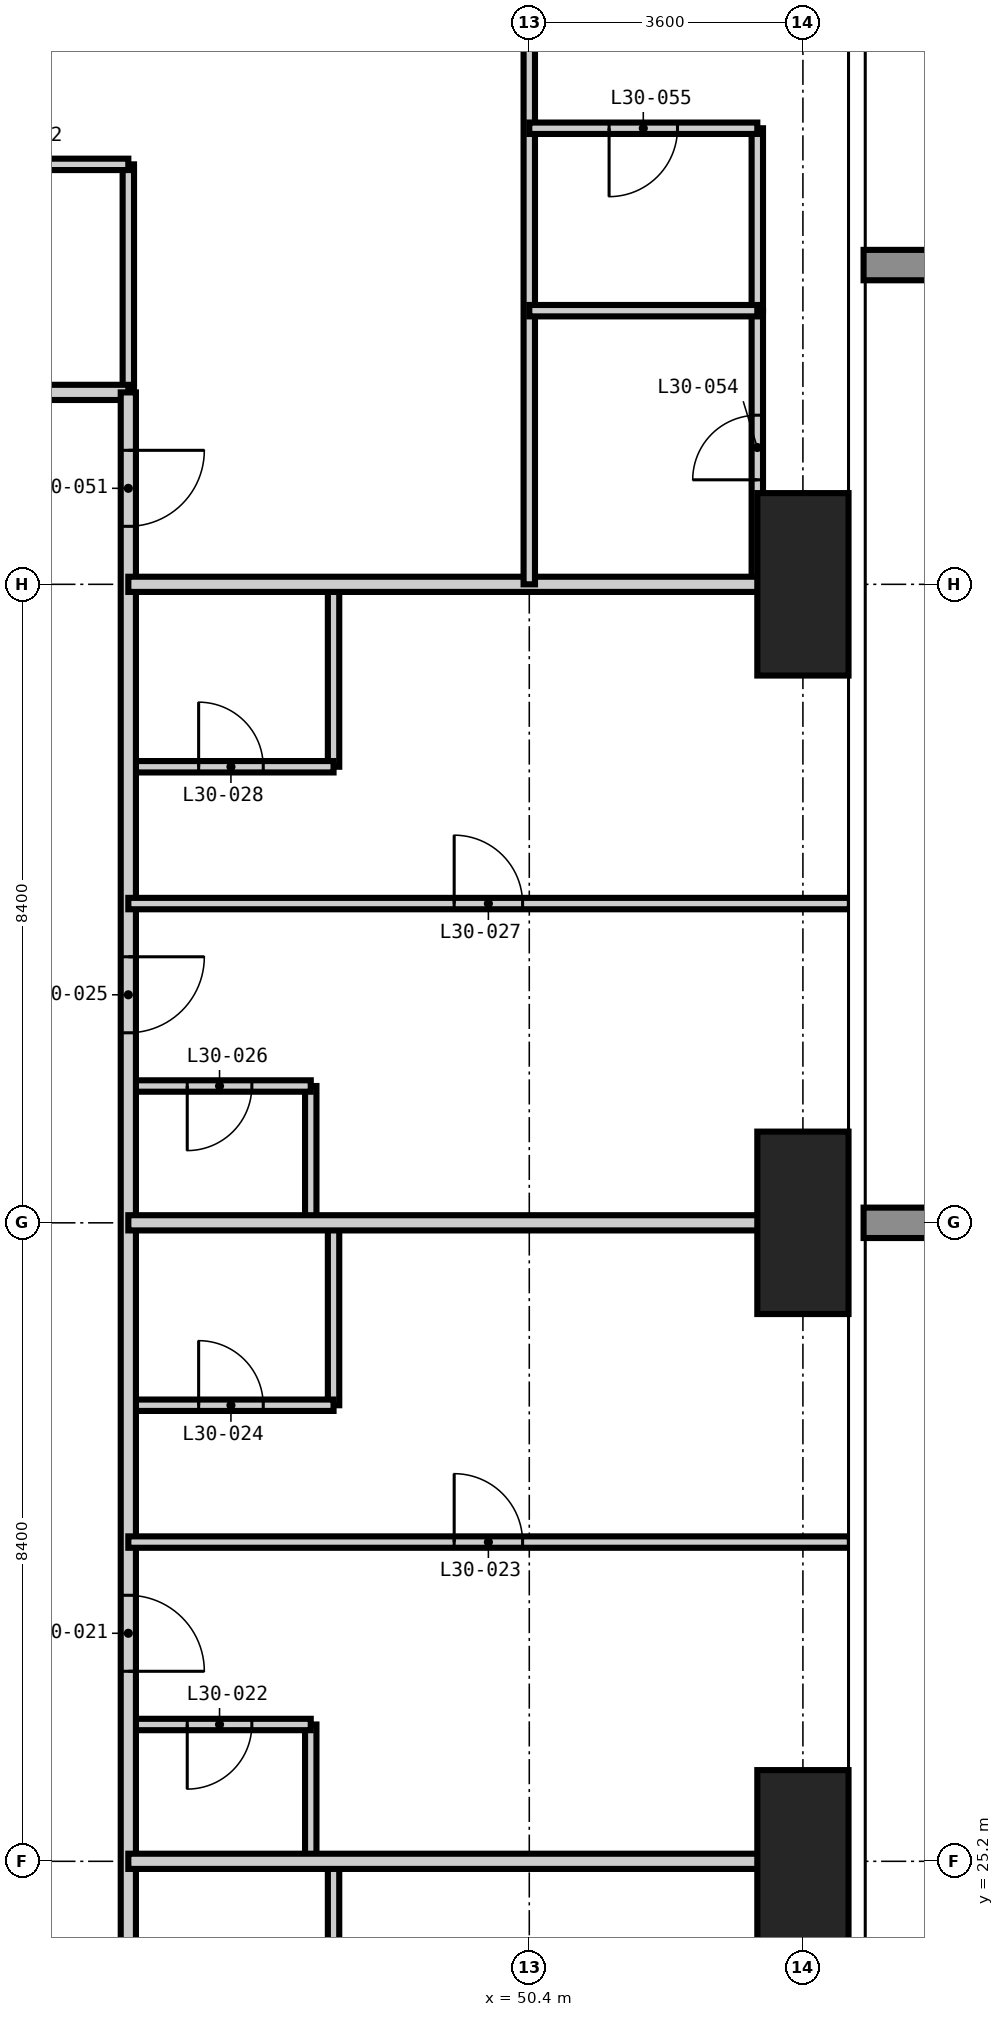
"""IFC4 building model, lengths in metres.
Left out: names, types, materials, properties, quantities, classifications, styles, units other than length and angle.
Written with IfcOpenShell. Run it as: python <this file> out.ifc"""

import sys

from ifc_helpers import new_model, si_unit, direction, frame, frame_2d, origin, origin_2d, place, context, subcontext, project, spatial, rectangle, extrude, element, fill, save


model = new_model("IFC4")
c1 = context("Model", 3, precision=1e-05, world=origin(), true_north=direction((0.0, 1.0)))
c2 = subcontext(c1, "Body", "Model", "MODEL_VIEW")
j1 = project(units=[si_unit("LENGTHUNIT", "METRE"), si_unit("PLANEANGLEUNIT", "RADIAN")], contexts=[c1])
p1 = place(None, origin())
s1 = spatial("IfcSite", under=j1, at=p1, CompositionType="ELEMENT")
p2 = place(p1, origin())
s2 = spatial("IfcBuilding", under=s1, at=p2, CompositionType="ELEMENT")
p3 = place(p2, frame((0.0, 0.0, 118.8)))
s3 = spatial("IfcBuildingStorey", under=s2, at=p3, CompositionType="ELEMENT", Elevation=118.8)
for number, where, z_axis, x_axis in (
    (1, (54.0, 25.2, -0.35), (0.0, 0.0, 1.0), (1.0, 0.0, 0.0)),
    (2, (54.0, 33.6, -0.35), (0.0, 0.0, 1.0), (1.0, 0.0, 0.0)),
    (3, (54.0, 42.0, -0.35), (0.0, 0.0, 1.0), (1.0, 0.0, 0.0)),
):
    element("IfcColumn", number, at=place(p3, frame(where, z_axis=z_axis, x_axis=x_axis)), inside=s3, PredefinedType="COLUMN", context=c2, shape_type="SweptSolid", body=[
        extrude(rectangle(XDim=1.2, YDim=2.4, at=origin_2d()), origin(), (0.0, 0.0, 1.0), 3.6),
    ])
p4 = place(p3, frame((45.125, 44.525, 0.0), z_axis=(0.0, 0.0, 1.0), x_axis=(0.0, 1.0, 0.0)))
e4 = element("IfcWall", 4, at=p4, inside=s3, PredefinedType="PARTITIONING", context=c2, shape_type="SweptSolid", body=[
    extrude(rectangle(XDim=3.0, YDim=0.15, at=frame_2d((1.5, 0.0))), origin(), (0.0, 0.0, 1.0), 3.25),
])
p5 = place(p3, frame((47.525, 25.2, 0.0), z_axis=(0.0, 0.0, 1.0), x_axis=(0.0, 1.0, 0.0)))
e5 = element("IfcWall", 5, at=p5, inside=s3, PredefinedType="PARTITIONING", context=c2, shape_type="SweptSolid", body=[
    extrude(rectangle(XDim=1.8, YDim=0.15, at=frame_2d((0.9, 0.0))), origin(), (0.0, 0.0, 1.0), 3.25),
])
p6 = place(p3, frame((47.525, 33.6, 0.0), z_axis=(0.0, 0.0, 1.0), x_axis=(0.0, 1.0, 0.0)))
e6 = element("IfcWall", 6, at=p6, inside=s3, PredefinedType="PARTITIONING", context=c2, shape_type="SweptSolid", body=[
    extrude(rectangle(XDim=1.8, YDim=0.15, at=frame_2d((0.9, 0.0))), origin(), (0.0, 0.0, 1.0), 3.25),
])
p7 = place(p3, frame((47.825, 22.8, 0.0), z_axis=(0.0, 0.0, 1.0), x_axis=(0.0, 1.0, 0.0)))
e7 = element("IfcWall", 7, at=p7, inside=s3, PredefinedType="PARTITIONING", context=c2, shape_type="SweptSolid", body=[
    extrude(rectangle(XDim=2.4, YDim=0.15, at=frame_2d((1.2, 0.0))), origin(), (0.0, 0.0, 1.0), 3.25),
])
p8 = place(p3, frame((47.825, 31.2, 0.0), z_axis=(0.0, 0.0, 1.0), x_axis=(0.0, 1.0, 0.0)))
e8 = element("IfcWall", 8, at=p8, inside=s3, PredefinedType="PARTITIONING", context=c2, shape_type="SweptSolid", body=[
    extrude(rectangle(XDim=2.4, YDim=0.15, at=frame_2d((1.2, 0.0))), origin(), (0.0, 0.0, 1.0), 3.25),
])
p9 = place(p3, frame((47.825, 39.6, 0.0), z_axis=(0.0, 0.0, 1.0), x_axis=(0.0, 1.0, 0.0)))
e9 = element("IfcWall", 9, at=p9, inside=s3, PredefinedType="PARTITIONING", context=c2, shape_type="SweptSolid", body=[
    extrude(rectangle(XDim=2.4, YDim=0.15, at=frame_2d((1.2, 0.0))), origin(), (0.0, 0.0, 1.0), 3.25),
])
p10 = place(p3, frame((53.4, 42.0, 0.0), z_axis=(0.0, 0.0, 1.0), x_axis=(0.0, 1.0, 0.0)))
e10 = element("IfcWall", 10, at=p10, inside=s3, PredefinedType="PARTITIONING", context=c2, shape_type="SweptSolid", body=[
    extrude(rectangle(XDim=3.6, YDim=0.15, at=frame_2d((1.8, 0.0))), origin(), (0.0, 0.0, 1.0), 3.25),
])
p11 = place(p10, frame((1.375, 0.0, 0.0)))
e11 = element("IfcOpeningElement", 11, at=p11, cuts=e10, PredefinedType="OPENING", context=c2, shape_type="SweptSolid", body=[
    extrude(rectangle(XDim=0.85, YDim=2.1, at=frame_2d((0.425, 1.05))), frame((0.0, 0.085, 0.0), z_axis=(0.0, -1.0, 0.0), x_axis=(1.0, 0.0, 0.0)), (0.0, 0.0, 1.0), 0.17),
])
p12 = place(p3, frame((45.125, 27.0, 0.0), z_axis=(0.0, 0.0, 1.0), x_axis=(1.0, 0.0, 0.0)))
e12 = element("IfcWall", 12, at=p12, inside=s3, PredefinedType="PARTITIONING", context=c2, shape_type="SweptSolid", body=[
    extrude(rectangle(XDim=2.4, YDim=0.15, at=frame_2d((1.2, 0.0))), origin(), (0.0, 0.0, 1.0), 3.25),
])
p13 = place(p12, frame((0.775, 0.0, 0.0)))
e13 = element("IfcOpeningElement", 13, at=p13, cuts=e12, PredefinedType="OPENING", context=c2, shape_type="SweptSolid", body=[
    extrude(rectangle(XDim=0.85, YDim=2.1, at=frame_2d((0.425, 1.05))), frame((0.0, 0.085, 0.0), z_axis=(0.0, -1.0, 0.0), x_axis=(1.0, 0.0, 0.0)), (0.0, 0.0, 1.0), 0.17),
])
p14 = place(p3, frame((45.125, 31.2, 0.0), z_axis=(0.0, 0.0, 1.0), x_axis=(1.0, 0.0, 0.0)))
e14 = element("IfcWall", 14, at=p14, inside=s3, PredefinedType="PARTITIONING", context=c2, shape_type="SweptSolid", body=[
    extrude(rectangle(XDim=2.7, YDim=0.15, at=frame_2d((1.35, 0.0))), origin(), (0.0, 0.0, 1.0), 3.25),
])
p15 = place(p14, frame((0.925, 0.0, 0.0)))
e15 = element("IfcOpeningElement", 15, at=p15, cuts=e14, PredefinedType="OPENING", context=c2, shape_type="SweptSolid", body=[
    extrude(rectangle(XDim=0.85, YDim=2.1, at=frame_2d((0.425, 1.05))), frame((0.0, 0.085, 0.0), z_axis=(0.0, -1.0, 0.0), x_axis=(1.0, 0.0, 0.0)), (0.0, 0.0, 1.0), 0.17),
])
p16 = place(p3, frame((45.125, 35.4, 0.0), z_axis=(0.0, 0.0, 1.0), x_axis=(1.0, 0.0, 0.0)))
e16 = element("IfcWall", 16, at=p16, inside=s3, PredefinedType="PARTITIONING", context=c2, shape_type="SweptSolid", body=[
    extrude(rectangle(XDim=2.4, YDim=0.15, at=frame_2d((1.2, 0.0))), origin(), (0.0, 0.0, 1.0), 3.25),
])
p17 = place(p16, frame((0.775, 0.0, 0.0)))
e17 = element("IfcOpeningElement", 17, at=p17, cuts=e16, PredefinedType="OPENING", context=c2, shape_type="SweptSolid", body=[
    extrude(rectangle(XDim=0.85, YDim=2.1, at=frame_2d((0.425, 1.05))), frame((0.0, 0.085, 0.0), z_axis=(0.0, -1.0, 0.0), x_axis=(1.0, 0.0, 0.0)), (0.0, 0.0, 1.0), 0.17),
])
p18 = place(p3, frame((45.125, 39.6, 0.0), z_axis=(0.0, 0.0, 1.0), x_axis=(1.0, 0.0, 0.0)))
e18 = element("IfcWall", 18, at=p18, inside=s3, PredefinedType="PARTITIONING", context=c2, shape_type="SweptSolid", body=[
    extrude(rectangle(XDim=2.7, YDim=0.15, at=frame_2d((1.35, 0.0))), origin(), (0.0, 0.0, 1.0), 3.25),
])
p19 = place(p18, frame((0.925, 0.0, 0.0)))
e19 = element("IfcOpeningElement", 19, at=p19, cuts=e18, PredefinedType="OPENING", context=c2, shape_type="SweptSolid", body=[
    extrude(rectangle(XDim=0.85, YDim=2.1, at=frame_2d((0.425, 1.05))), frame((0.0, 0.085, 0.0), z_axis=(0.0, -1.0, 0.0), x_axis=(1.0, 0.0, 0.0)), (0.0, 0.0, 1.0), 0.17),
])
p20 = place(p3, frame((42.0, 47.525, 0.0), z_axis=(0.0, 0.0, 1.0), x_axis=(1.0, 0.0, 0.0)))
e20 = element("IfcWall", 20, at=p20, inside=s3, PredefinedType="PARTITIONING", context=c2, shape_type="SweptSolid", body=[
    extrude(rectangle(XDim=3.125, YDim=0.15, at=frame_2d((1.562, 0.0))), origin(), (0.0, 0.0, 1.0), 3.25),
])
p21 = place(p20, frame((1.138, 0.0, 0.0)))
e21 = element("IfcOpeningElement", 21, at=p21, cuts=e20, PredefinedType="OPENING", context=c2, shape_type="SweptSolid", body=[
    extrude(rectangle(XDim=0.85, YDim=2.1, at=frame_2d((0.425, 1.05))), frame((0.0, 0.085, 0.0), z_axis=(0.0, -1.0, 0.0), x_axis=(1.0, 0.0, 0.0)), (0.0, 0.0, 1.0), 0.17),
])
p22 = place(p3, frame((12.6, 44.525, 0.0), z_axis=(0.0, 0.0, 1.0), x_axis=(1.0, 0.0, 0.0)))
e22 = element("IfcWall", 22, at=p22, inside=s3, PredefinedType="PARTITIONING", context=c2, shape_type="SweptSolid", body=[
    extrude(rectangle(XDim=32.525, YDim=0.2, at=frame_2d((16.262, 0.0))), origin(), (0.0, 0.0, 1.0), 3.25),
])
p23 = place(p22, frame((9.1, 0.0, 0.0)))
e23 = element("IfcOpeningElement", 23, at=p23, cuts=e22, PredefinedType="OPENING", context=c2, shape_type="SweptSolid", body=[
    extrude(rectangle(XDim=1.0, YDim=2.2, at=frame_2d((0.5, 1.1))), frame((0.0, 0.11, 0.0), z_axis=(0.0, -1.0, 0.0), x_axis=(1.0, 0.0, 0.0)), (0.0, 0.0, 1.0), 0.22),
])
p24 = place(p22, frame((17.5, 0.0, 0.0)))
e24 = element("IfcOpeningElement", 24, at=p24, cuts=e22, PredefinedType="OPENING", context=c2, shape_type="SweptSolid", body=[
    extrude(rectangle(XDim=1.0, YDim=2.2, at=frame_2d((0.5, 1.1))), frame((0.0, 0.11, 0.0), z_axis=(0.0, -1.0, 0.0), x_axis=(1.0, 0.0, 0.0)), (0.0, 0.0, 1.0), 0.22),
])
p25 = place(p22, frame((25.9, 0.0, 0.0)))
e25 = element("IfcOpeningElement", 25, at=p25, cuts=e22, PredefinedType="OPENING", context=c2, shape_type="SweptSolid", body=[
    extrude(rectangle(XDim=1.0, YDim=2.2, at=frame_2d((0.5, 1.1))), frame((0.0, 0.11, 0.0), z_axis=(0.0, -1.0, 0.0), x_axis=(1.0, 0.0, 0.0)), (0.0, 0.0, 1.0), 0.22),
])
p26 = place(p3, frame((45.125, 44.525, 0.0), z_axis=(0.0, 0.0, 1.0), x_axis=(0.0, -1.0, 0.0)))
e26 = element("IfcWall", 26, at=p26, inside=s3, PredefinedType="PARTITIONING", context=c2, shape_type="SweptSolid", body=[
    extrude(rectangle(XDim=31.45, YDim=0.2, at=frame_2d((15.725, 0.0))), origin(), (0.0, 0.0, 1.0), 3.25),
])
p27 = place(p26, frame((24.225, 0.0, 0.0)))
e27 = element("IfcOpeningElement", 27, at=p27, cuts=e26, PredefinedType="OPENING", context=c2, shape_type="SweptSolid", body=[
    extrude(rectangle(XDim=1.0, YDim=2.2, at=frame_2d((0.5, 1.1))), frame((0.0, 0.11, 0.0), z_axis=(0.0, -1.0, 0.0), x_axis=(1.0, 0.0, 0.0)), (0.0, 0.0, 1.0), 0.22),
])
p28 = place(p26, frame((15.825, 0.0, 0.0)))
e28 = element("IfcOpeningElement", 28, at=p28, cuts=e26, PredefinedType="OPENING", context=c2, shape_type="SweptSolid", body=[
    extrude(rectangle(XDim=1.0, YDim=2.2, at=frame_2d((0.5, 1.1))), frame((0.0, 0.11, 0.0), z_axis=(0.0, -1.0, 0.0), x_axis=(1.0, 0.0, 0.0)), (0.0, 0.0, 1.0), 0.22),
])
p29 = place(p26, frame((7.425, 0.0, 0.0)))
e29 = element("IfcOpeningElement", 29, at=p29, cuts=e26, PredefinedType="OPENING", context=c2, shape_type="SweptSolid", body=[
    extrude(rectangle(XDim=1.0, YDim=2.2, at=frame_2d((0.5, 1.1))), frame((0.0, 0.11, 0.0), z_axis=(0.0, -1.0, 0.0), x_axis=(1.0, 0.0, 0.0)), (0.0, 0.0, 1.0), 0.22),
])
p30 = place(p26, frame((29.087, 0.0, 0.0)))
e30 = element("IfcOpeningElement", 30, at=p30, cuts=e26, PredefinedType="OPENING", context=c2, shape_type="SweptSolid", body=[
    extrude(rectangle(XDim=1.0, YDim=2.2, at=frame_2d((0.5, 1.1))), frame((0.0, 0.11, 0.0), z_axis=(0.0, -1.0, 0.0), x_axis=(1.0, 0.0, 0.0)), (0.0, 0.0, 1.0), 0.22),
])
p31 = place(p26, frame((0.762, 0.0, 0.0)))
e31 = element("IfcOpeningElement", 31, at=p31, cuts=e26, PredefinedType="OPENING", context=c2, shape_type="SweptSolid", body=[
    extrude(rectangle(XDim=1.0, YDim=2.2, at=frame_2d((0.5, 1.1))), frame((0.0, 0.11, 0.0), z_axis=(0.0, -1.0, 0.0), x_axis=(1.0, 0.0, 0.0)), (0.0, 0.0, 1.0), 0.22),
])
for number, where, z_axis, x_axis in (
    (32, (45.125, 25.2, 0.0), (0.0, 0.0, 1.0), (1.0, 0.0, 0.0)),
    (33, (45.125, 33.6, 0.0), (0.0, 0.0, 1.0), (1.0, 0.0, 0.0)),
    (34, (45.125, 42.0, 0.0), (0.0, 0.0, 1.0), (1.0, 0.0, 0.0)),
):
    element("IfcWall", number, at=place(p3, frame(where, z_axis=z_axis, x_axis=x_axis)), inside=s3, PredefinedType="PARTITIONING", context=c2, shape_type="SweptSolid", body=[
        extrude(rectangle(XDim=9.493, YDim=0.2, at=frame_2d((4.747, 0.0))), origin(), (0.0, 0.0, 1.0), 3.25),
    ])
p32 = place(p3, frame((50.4, 42.0, 0.0), z_axis=(0.0, 0.0, 1.0), x_axis=(0.0, 1.0, 0.0)))
e35 = element("IfcWall", 35, at=p32, inside=s3, PredefinedType="PARTITIONING", context=c2, shape_type="SweptSolid", body=[
    extrude(rectangle(XDim=12.618, YDim=0.15, at=frame_2d((6.309, 0.0))), origin(), (0.0, 0.0, 1.0), 3.25),
])
p33 = place(p32, frame((8.85, 0.0, 0.0)))
e36 = element("IfcOpeningElement", 36, at=p33, cuts=e35, PredefinedType="OPENING", context=c2, shape_type="SweptSolid", body=[
    extrude(rectangle(XDim=0.9, YDim=2.1, at=frame_2d((0.45, 1.05))), frame((0.0, 0.085, 0.0), z_axis=(0.0, -1.0, 0.0), x_axis=(1.0, 0.0, 0.0)), (0.0, 0.0, 1.0), 0.17),
])
p34 = place(p3, frame((53.4, 45.6, 0.0), z_axis=(0.0, 0.0, 1.0), x_axis=(0.0, 1.0, 0.0)))
e37 = element("IfcWall", 37, at=p34, inside=s3, PredefinedType="PARTITIONING", context=c2, shape_type="SweptSolid", body=[
    extrude(rectangle(XDim=2.4, YDim=0.15, at=frame_2d((1.2, 0.0))), origin(), (0.0, 0.0, 1.0), 3.25),
])
p35 = place(p3, frame((45.125, 29.4, 0.0), z_axis=(0.0, 0.0, 1.0), x_axis=(1.0, 0.0, 0.0)))
e38 = element("IfcWall", 38, at=p35, inside=s3, PredefinedType="PARTITIONING", context=c2, shape_type="SweptSolid", body=[
    extrude(rectangle(XDim=9.493, YDim=0.15, at=frame_2d((4.747, 0.0))), origin(), (0.0, 0.0, 1.0), 3.25),
])
p36 = place(p35, frame((4.287, 0.0, 0.0)))
e39 = element("IfcOpeningElement", 39, at=p36, cuts=e38, PredefinedType="OPENING", context=c2, shape_type="SweptSolid", body=[
    extrude(rectangle(XDim=0.9, YDim=2.1, at=frame_2d((0.45, 1.05))), frame((0.0, 0.085, 0.0), z_axis=(0.0, -1.0, 0.0), x_axis=(1.0, 0.0, 0.0)), (0.0, 0.0, 1.0), 0.17),
])
p37 = place(p3, frame((45.125, 37.8, 0.0), z_axis=(0.0, 0.0, 1.0), x_axis=(1.0, 0.0, 0.0)))
e40 = element("IfcWall", 40, at=p37, inside=s3, PredefinedType="PARTITIONING", context=c2, shape_type="SweptSolid", body=[
    extrude(rectangle(XDim=9.493, YDim=0.15, at=frame_2d((4.747, 0.0))), origin(), (0.0, 0.0, 1.0), 3.25),
])
p38 = place(p37, frame((4.287, 0.0, 0.0)))
e41 = element("IfcOpeningElement", 41, at=p38, cuts=e40, PredefinedType="OPENING", context=c2, shape_type="SweptSolid", body=[
    extrude(rectangle(XDim=0.9, YDim=2.1, at=frame_2d((0.45, 1.05))), frame((0.0, 0.085, 0.0), z_axis=(0.0, -1.0, 0.0), x_axis=(1.0, 0.0, 0.0)), (0.0, 0.0, 1.0), 0.17),
])
p39 = place(p3, frame((50.4, 45.6, 0.0), z_axis=(0.0, 0.0, 1.0), x_axis=(1.0, 0.0, 0.0)))
e42 = element("IfcWall", 42, at=p39, inside=s3, PredefinedType="PARTITIONING", context=c2, shape_type="SweptSolid", body=[
    extrude(rectangle(XDim=3.0, YDim=0.15, at=frame_2d((1.5, 0.0))), origin(), (0.0, 0.0, 1.0), 3.25),
])
p40 = place(p3, frame((50.4, 48.0, 0.0), z_axis=(0.0, 0.0, 1.0), x_axis=(1.0, 0.0, 0.0)))
e43 = element("IfcWall", 43, at=p40, inside=s3, PredefinedType="PARTITIONING", context=c2, shape_type="SweptSolid", body=[
    extrude(rectangle(XDim=3.0, YDim=0.15, at=frame_2d((1.5, 0.0))), origin(), (0.0, 0.0, 1.0), 3.25),
])
p41 = place(p40, frame((1.05, 0.0, 0.0)))
e44 = element("IfcOpeningElement", 44, at=p41, cuts=e43, PredefinedType="OPENING", context=c2, shape_type="SweptSolid", body=[
    extrude(rectangle(XDim=0.9, YDim=2.1, at=frame_2d((0.45, 1.05))), frame((0.0, 0.085, 0.0), z_axis=(0.0, -1.0, 0.0), x_axis=(1.0, 0.0, 0.0)), (0.0, 0.0, 1.0), 0.17),
])
p42 = place(p28, origin())
e45 = element("IfcDoor", 45, at=p42, inside=s3, OperationType="SINGLE_SWING_RIGHT", PredefinedType="DOOR", context=c2, shape_type="SweptSolid", body=[
    extrude(rectangle(XDim=1.0, YDim=2.2, at=frame_2d((0.5, 1.1))), frame((0.0, 0.025, 0.0), z_axis=(0.0, -1.0, 0.0), x_axis=(1.0, 0.0, 0.0)), (0.0, 0.0, 1.0), 0.05),
])
fill(e28, e45)
p43 = place(p13, frame((0.85, 0.0, 0.0), z_axis=(0.0, 0.0, 1.0), x_axis=(-1.0, 0.0, 0.0)))
e46 = element("IfcDoor", 46, at=p43, inside=s3, OperationType="SINGLE_SWING_RIGHT", PredefinedType="DOOR", context=c2, shape_type="SweptSolid", body=[
    extrude(rectangle(XDim=0.85, YDim=2.1, at=frame_2d((0.425, 1.05))), frame((0.0, 0.025, 0.0), z_axis=(0.0, -1.0, 0.0), x_axis=(1.0, 0.0, 0.0)), (0.0, 0.0, 1.0), 0.05),
])
fill(e13, e46)
p44 = place(p36, origin())
e47 = element("IfcDoor", 47, at=p44, inside=s3, OperationType="SINGLE_SWING_LEFT", PredefinedType="DOOR", context=c2, shape_type="SweptSolid", body=[
    extrude(rectangle(XDim=0.9, YDim=2.1, at=frame_2d((0.45, 1.05))), frame((0.0, 0.025, 0.0), z_axis=(0.0, -1.0, 0.0), x_axis=(1.0, 0.0, 0.0)), (0.0, 0.0, 1.0), 0.05),
])
fill(e39, e47)
p45 = place(p15, origin())
e48 = element("IfcDoor", 48, at=p45, inside=s3, OperationType="SINGLE_SWING_LEFT", PredefinedType="DOOR", context=c2, shape_type="SweptSolid", body=[
    extrude(rectangle(XDim=0.85, YDim=2.1, at=frame_2d((0.425, 1.05))), frame((0.0, 0.025, 0.0), z_axis=(0.0, -1.0, 0.0), x_axis=(1.0, 0.0, 0.0)), (0.0, 0.0, 1.0), 0.05),
])
fill(e15, e48)
p46 = place(p29, origin())
e49 = element("IfcDoor", 49, at=p46, inside=s3, OperationType="SINGLE_SWING_LEFT", PredefinedType="DOOR", context=c2, shape_type="SweptSolid", body=[
    extrude(rectangle(XDim=1.0, YDim=2.2, at=frame_2d((0.5, 1.1))), frame((0.0, 0.025, 0.0), z_axis=(0.0, -1.0, 0.0), x_axis=(1.0, 0.0, 0.0)), (0.0, 0.0, 1.0), 0.05),
])
fill(e29, e49)
p47 = place(p17, frame((0.85, 0.0, 0.0), z_axis=(0.0, 0.0, 1.0), x_axis=(-1.0, 0.0, 0.0)))
e50 = element("IfcDoor", 50, at=p47, inside=s3, OperationType="SINGLE_SWING_RIGHT", PredefinedType="DOOR", context=c2, shape_type="SweptSolid", body=[
    extrude(rectangle(XDim=0.85, YDim=2.1, at=frame_2d((0.425, 1.05))), frame((0.0, 0.025, 0.0), z_axis=(0.0, -1.0, 0.0), x_axis=(1.0, 0.0, 0.0)), (0.0, 0.0, 1.0), 0.05),
])
fill(e17, e50)
p48 = place(p38, origin())
e51 = element("IfcDoor", 51, at=p48, inside=s3, OperationType="SINGLE_SWING_LEFT", PredefinedType="DOOR", context=c2, shape_type="SweptSolid", body=[
    extrude(rectangle(XDim=0.9, YDim=2.1, at=frame_2d((0.45, 1.05))), frame((0.0, 0.025, 0.0), z_axis=(0.0, -1.0, 0.0), x_axis=(1.0, 0.0, 0.0)), (0.0, 0.0, 1.0), 0.05),
])
fill(e41, e51)
p49 = place(p19, origin())
e52 = element("IfcDoor", 52, at=p49, inside=s3, OperationType="SINGLE_SWING_LEFT", PredefinedType="DOOR", context=c2, shape_type="SweptSolid", body=[
    extrude(rectangle(XDim=0.85, YDim=2.1, at=frame_2d((0.425, 1.05))), frame((0.0, 0.025, 0.0), z_axis=(0.0, -1.0, 0.0), x_axis=(1.0, 0.0, 0.0)), (0.0, 0.0, 1.0), 0.05),
])
fill(e19, e52)
p50 = place(p31, origin())
e53 = element("IfcDoor", 53, at=p50, inside=s3, OperationType="SINGLE_SWING_LEFT", PredefinedType="DOOR", context=c2, shape_type="SweptSolid", body=[
    extrude(rectangle(XDim=1.0, YDim=2.2, at=frame_2d((0.5, 1.1))), frame((0.0, 0.025, 0.0), z_axis=(0.0, -1.0, 0.0), x_axis=(1.0, 0.0, 0.0)), (0.0, 0.0, 1.0), 0.05),
])
fill(e31, e53)
p51 = place(p11, origin())
e54 = element("IfcDoor", 54, at=p51, inside=s3, OperationType="SINGLE_SWING_LEFT", PredefinedType="DOOR", context=c2, shape_type="SweptSolid", body=[
    extrude(rectangle(XDim=0.85, YDim=2.1, at=frame_2d((0.425, 1.05))), frame((0.0, 0.025, 0.0), z_axis=(0.0, -1.0, 0.0), x_axis=(1.0, 0.0, 0.0)), (0.0, 0.0, 1.0), 0.05),
])
fill(e11, e54)
p52 = place(p41, frame((0.9, 0.0, 0.0), z_axis=(0.0, 0.0, 1.0), x_axis=(-1.0, 0.0, 0.0)))
e55 = element("IfcDoor", 55, at=p52, inside=s3, OperationType="SINGLE_SWING_RIGHT", PredefinedType="DOOR", context=c2, shape_type="SweptSolid", body=[
    extrude(rectangle(XDim=0.9, YDim=2.1, at=frame_2d((0.45, 1.05))), frame((0.0, 0.025, 0.0), z_axis=(0.0, -1.0, 0.0), x_axis=(1.0, 0.0, 0.0)), (0.0, 0.0, 1.0), 0.05),
])
fill(e44, e55)
save(model, sys.argv[1])
